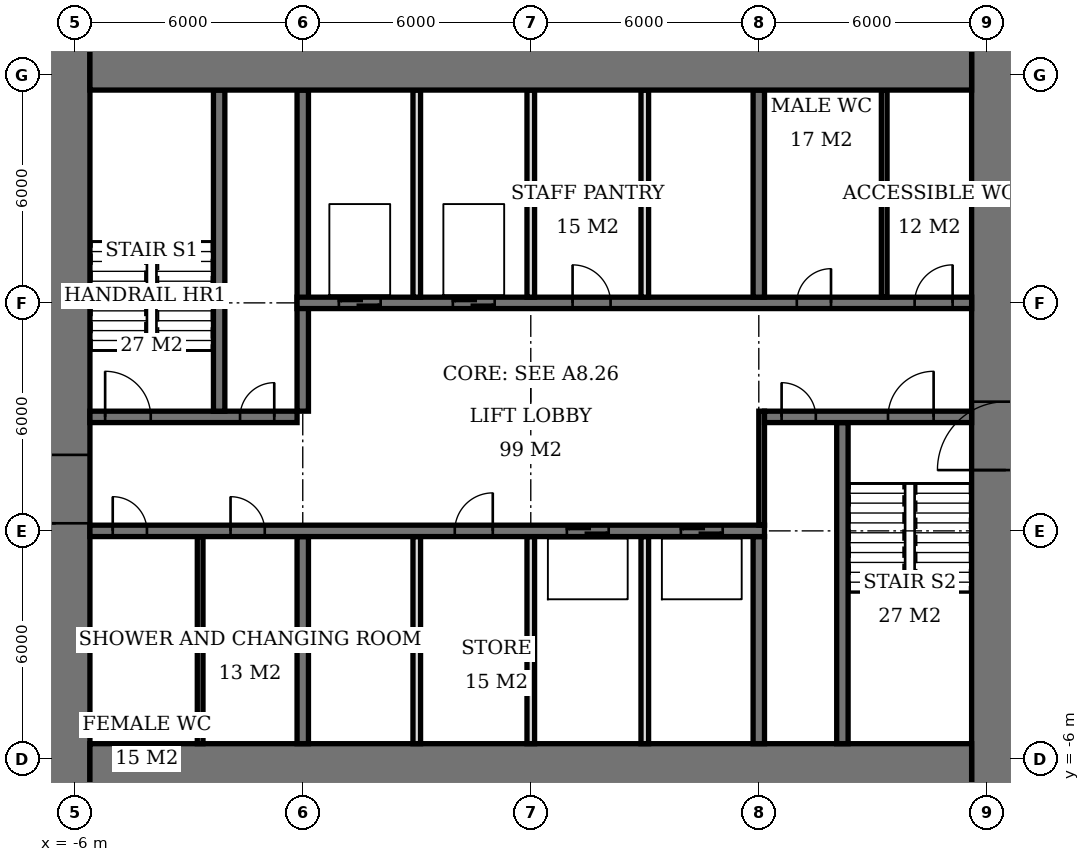
"""IFC4 building model, lengths in metres.
Left out: names, types, materials, properties, quantities, classifications, styles, units other than length and angle.
Written with IfcOpenShell. Run it as: python <this file> out.ifc"""

import sys

from ifc_helpers import new_model, si_unit, direction, frame, frame_2d, origin, place, context, subcontext, project, spatial, rectangle, extrude, element, fill, save


model = new_model("IFC4")
c1 = context("Model", 3, precision=1e-05, world=origin(), true_north=direction((0.0, 1.0)))
c2 = subcontext(c1, "Body", "Model", "MODEL_VIEW")
j1 = project(units=[si_unit("LENGTHUNIT", "METRE"), si_unit("PLANEANGLEUNIT", "RADIAN")], contexts=[c1])
p1 = place(None, origin())
s1 = spatial("IfcSite", under=j1, at=p1, CompositionType="ELEMENT")
p2 = place(p1, origin())
s2 = spatial("IfcBuilding", under=s1, at=p2, CompositionType="ELEMENT")
p3 = place(p2, frame((0.0, 0.0, 216.2)))
s3 = spatial("IfcBuildingStorey", under=s2, at=p3, CompositionType="ELEMENT", Elevation=216.2)
for number, where, z_axis, x_axis in (
    (1, (-5.6, -6.6, 0.0), (0.0, 0.0, 1.0), (1.0, 0.0, 0.0)),
    (2, (-5.6, 12.6, 0.0), (0.0, 0.0, 1.0), (1.0, 0.0, 0.0)),
):
    element("IfcWall", number, at=place(p3, frame(where, z_axis=z_axis, x_axis=x_axis)), inside=s3, PredefinedType="SHEAR", context=c2, shape_type="SweptSolid", body=[
        extrude(rectangle(XDim=23.2, YDim=2.0, at=frame_2d((11.6, 0.0))), origin(), (0.0, 0.0, 1.0), 3.9),
    ])
p4 = place(p3, frame((-6.5, -7.6, 0.0), z_axis=(0.0, 0.0, 1.0), x_axis=(0.0, 1.0, 0.0)))
e3 = element("IfcWall", 3, at=p4, inside=s3, PredefinedType="SHEAR", context=c2, shape_type="SweptSolid", body=[
    extrude(rectangle(XDim=21.2, YDim=1.8, at=frame_2d((10.6, 0.0))), origin(), (0.0, 0.0, 1.0), 3.9),
])
p5 = place(p4, frame((7.8, 0.0, 0.0)))
e4 = element("IfcOpeningElement", 4, at=p5, cuts=e3, PredefinedType="OPENING", context=c2, shape_type="SweptSolid", body=[
    extrude(rectangle(XDim=1.8, YDim=2.4, at=frame_2d((0.9, 1.2))), frame((0.0, 0.91, 0.0), z_axis=(0.0, -1.0, 0.0), x_axis=(1.0, 0.0, 0.0)), (0.0, 0.0, 1.0), 1.82),
])
p6 = place(p3, frame((18.5, -7.6, 0.0), z_axis=(0.0, 0.0, 1.0), x_axis=(0.0, 1.0, 0.0)))
e5 = element("IfcWall", 5, at=p6, inside=s3, PredefinedType="SHEAR", context=c2, shape_type="SweptSolid", body=[
    extrude(rectangle(XDim=21.2, YDim=1.8, at=frame_2d((10.6, 0.0))), origin(), (0.0, 0.0, 1.0), 3.9),
])
p7 = place(p6, frame((9.2, 0.0, 0.0)))
e6 = element("IfcOpeningElement", 6, at=p7, cuts=e5, PredefinedType="OPENING", context=c2, shape_type="SweptSolid", body=[
    extrude(rectangle(XDim=1.8, YDim=2.4, at=frame_2d((0.9, 1.2))), frame((0.0, 0.91, 0.0), z_axis=(0.0, -1.0, 0.0), x_axis=(1.0, 0.0, 0.0)), (0.0, 0.0, 1.0), 1.82),
])
p8 = place(p3, frame((-5.6, 0.0, 0.0), z_axis=(0.0, 0.0, 1.0), x_axis=(1.0, 0.0, 0.0)))
e7 = element("IfcWall", 7, at=p8, inside=s3, PredefinedType="SHEAR", context=c2, shape_type="SweptSolid", body=[
    extrude(rectangle(XDim=17.75, YDim=0.3, at=frame_2d((8.875, 0.0))), origin(), (0.0, 0.0, 1.0), 3.9),
])
p9 = place(p8, frame((0.6, 0.0, 0.0)))
e8 = element("IfcOpeningElement", 8, at=p9, cuts=e7, PredefinedType="OPENING", context=c2, shape_type="SweptSolid", body=[
    extrude(rectangle(XDim=0.9, YDim=2.1, at=frame_2d((0.45, 1.05))), frame((0.0, 0.16, 0.0), z_axis=(0.0, -1.0, 0.0), x_axis=(1.0, 0.0, 0.0)), (0.0, 0.0, 1.0), 0.32),
])
p10 = place(p8, frame((3.7, 0.0, 0.0)))
e9 = element("IfcOpeningElement", 9, at=p10, cuts=e7, PredefinedType="OPENING", context=c2, shape_type="SweptSolid", body=[
    extrude(rectangle(XDim=0.9, YDim=2.1, at=frame_2d((0.45, 1.05))), frame((0.0, 0.16, 0.0), z_axis=(0.0, -1.0, 0.0), x_axis=(1.0, 0.0, 0.0)), (0.0, 0.0, 1.0), 0.32),
])
p11 = place(p8, frame((9.6, 0.0, 0.0)))
e10 = element("IfcOpeningElement", 10, at=p11, cuts=e7, PredefinedType="OPENING", context=c2, shape_type="SweptSolid", body=[
    extrude(rectangle(XDim=1.0, YDim=2.1, at=frame_2d((0.5, 1.05))), frame((0.0, 0.16, 0.0), z_axis=(0.0, -1.0, 0.0), x_axis=(1.0, 0.0, 0.0)), (0.0, 0.0, 1.0), 0.32),
])
p12 = place(p8, frame((12.55, 0.0, 0.0)))
e11 = element("IfcOpeningElement", 11, at=p12, cuts=e7, PredefinedType="OPENING", context=c2, shape_type="SweptSolid", body=[
    extrude(rectangle(XDim=1.1, YDim=2.1, at=frame_2d((0.55, 1.05))), frame((0.0, 0.16, 0.0), z_axis=(0.0, -1.0, 0.0), x_axis=(1.0, 0.0, 0.0)), (0.0, 0.0, 1.0), 0.32),
])
p13 = place(p8, frame((15.55, 0.0, 0.0)))
e12 = element("IfcOpeningElement", 12, at=p13, cuts=e7, PredefinedType="OPENING", context=c2, shape_type="SweptSolid", body=[
    extrude(rectangle(XDim=1.1, YDim=2.1, at=frame_2d((0.55, 1.05))), frame((0.0, 0.16, 0.0), z_axis=(0.0, -1.0, 0.0), x_axis=(1.0, 0.0, 0.0)), (0.0, 0.0, 1.0), 0.32),
])
p14 = place(p3, frame((-5.6, 3.0, 0.0), z_axis=(0.0, 0.0, 1.0), x_axis=(1.0, 0.0, 0.0)))
e13 = element("IfcWall", 13, at=p14, inside=s3, PredefinedType="SHEAR", context=c2, shape_type="SweptSolid", body=[
    extrude(rectangle(XDim=5.45, YDim=0.3, at=frame_2d((2.725, 0.0))), origin(), (0.0, 0.0, 1.0), 3.9),
])
p15 = place(p14, frame((0.4, 0.0, 0.0)))
e14 = element("IfcOpeningElement", 14, at=p15, cuts=e13, PredefinedType="OPENING", context=c2, shape_type="SweptSolid", body=[
    extrude(rectangle(XDim=1.2, YDim=2.1, at=frame_2d((0.6, 1.05))), frame((0.0, 0.16, 0.0), z_axis=(0.0, -1.0, 0.0), x_axis=(1.0, 0.0, 0.0)), (0.0, 0.0, 1.0), 0.32),
])
p16 = place(p14, frame((3.95, 0.0, 0.0)))
e15 = element("IfcOpeningElement", 15, at=p16, cuts=e13, PredefinedType="OPENING", context=c2, shape_type="SweptSolid", body=[
    extrude(rectangle(XDim=0.9, YDim=2.1, at=frame_2d((0.45, 1.05))), frame((0.0, 0.16, 0.0), z_axis=(0.0, -1.0, 0.0), x_axis=(1.0, 0.0, 0.0)), (0.0, 0.0, 1.0), 0.32),
])
p17 = place(p3, frame((12.15, 3.0, 0.0), z_axis=(0.0, 0.0, 1.0), x_axis=(1.0, 0.0, 0.0)))
e16 = element("IfcWall", 16, at=p17, inside=s3, PredefinedType="SHEAR", context=c2, shape_type="SweptSolid", body=[
    extrude(rectangle(XDim=5.45, YDim=0.3, at=frame_2d((2.725, 0.0))), origin(), (0.0, 0.0, 1.0), 3.9),
])
p18 = place(p17, frame((3.25, 0.0, 0.0)))
e17 = element("IfcOpeningElement", 17, at=p18, cuts=e16, PredefinedType="OPENING", context=c2, shape_type="SweptSolid", body=[
    extrude(rectangle(XDim=1.2, YDim=2.1, at=frame_2d((0.6, 1.05))), frame((0.0, 0.16, 0.0), z_axis=(0.0, -1.0, 0.0), x_axis=(1.0, 0.0, 0.0)), (0.0, 0.0, 1.0), 0.32),
])
p19 = place(p17, frame((0.45, 0.0, 0.0)))
e18 = element("IfcOpeningElement", 18, at=p19, cuts=e16, PredefinedType="OPENING", context=c2, shape_type="SweptSolid", body=[
    extrude(rectangle(XDim=0.9, YDim=2.1, at=frame_2d((0.45, 1.05))), frame((0.0, 0.16, 0.0), z_axis=(0.0, -1.0, 0.0), x_axis=(1.0, 0.0, 0.0)), (0.0, 0.0, 1.0), 0.32),
])
p20 = place(p3, frame((-0.15, 6.0, 0.0), z_axis=(0.0, 0.0, 1.0), x_axis=(1.0, 0.0, 0.0)))
e19 = element("IfcWall", 19, at=p20, inside=s3, PredefinedType="SHEAR", context=c2, shape_type="SweptSolid", body=[
    extrude(rectangle(XDim=17.75, YDim=0.3, at=frame_2d((8.875, 0.0))), origin(), (0.0, 0.0, 1.0), 3.9),
])
p21 = place(p20, frame((13.15, 0.0, 0.0)))
e20 = element("IfcOpeningElement", 20, at=p21, cuts=e19, PredefinedType="OPENING", context=c2, shape_type="SweptSolid", body=[
    extrude(rectangle(XDim=0.9, YDim=2.1, at=frame_2d((0.45, 1.05))), frame((0.0, 0.16, 0.0), z_axis=(0.0, -1.0, 0.0), x_axis=(1.0, 0.0, 0.0)), (0.0, 0.0, 1.0), 0.32),
])
p22 = place(p20, frame((16.25, 0.0, 0.0)))
e21 = element("IfcOpeningElement", 21, at=p22, cuts=e19, PredefinedType="OPENING", context=c2, shape_type="SweptSolid", body=[
    extrude(rectangle(XDim=1.0, YDim=2.1, at=frame_2d((0.5, 1.05))), frame((0.0, 0.16, 0.0), z_axis=(0.0, -1.0, 0.0), x_axis=(1.0, 0.0, 0.0)), (0.0, 0.0, 1.0), 0.32),
])
p23 = place(p20, frame((7.25, 0.0, 0.0)))
e22 = element("IfcOpeningElement", 22, at=p23, cuts=e19, PredefinedType="OPENING", context=c2, shape_type="SweptSolid", body=[
    extrude(rectangle(XDim=1.0, YDim=2.1, at=frame_2d((0.5, 1.05))), frame((0.0, 0.16, 0.0), z_axis=(0.0, -1.0, 0.0), x_axis=(1.0, 0.0, 0.0)), (0.0, 0.0, 1.0), 0.32),
])
p24 = place(p20, frame((1.1, 0.0, 0.0)))
e23 = element("IfcOpeningElement", 23, at=p24, cuts=e19, PredefinedType="OPENING", context=c2, shape_type="SweptSolid", body=[
    extrude(rectangle(XDim=1.1, YDim=2.1, at=frame_2d((0.55, 1.05))), frame((0.0, 0.16, 0.0), z_axis=(0.0, -1.0, 0.0), x_axis=(1.0, 0.0, 0.0)), (0.0, 0.0, 1.0), 0.32),
])
p25 = place(p20, frame((4.1, 0.0, 0.0)))
e24 = element("IfcOpeningElement", 24, at=p25, cuts=e19, PredefinedType="OPENING", context=c2, shape_type="SweptSolid", body=[
    extrude(rectangle(XDim=1.1, YDim=2.1, at=frame_2d((0.55, 1.05))), frame((0.0, 0.16, 0.0), z_axis=(0.0, -1.0, 0.0), x_axis=(1.0, 0.0, 0.0)), (0.0, 0.0, 1.0), 0.32),
])
p26 = place(p3, frame((0.0, -5.6, 0.0), z_axis=(0.0, 0.0, 1.0), x_axis=(0.0, 1.0, 0.0)))
e25 = element("IfcWall", 25, at=p26, inside=s3, PredefinedType="SHEAR", context=c2, shape_type="SweptSolid", body=[
    extrude(rectangle(XDim=5.45, YDim=0.3, at=frame_2d((2.725, 0.0))), origin(), (0.0, 0.0, 1.0), 3.9),
])
p27 = place(p3, frame((0.0, 3.15, 0.0), z_axis=(0.0, 0.0, 1.0), x_axis=(0.0, 1.0, 0.0)))
e26 = element("IfcWall", 26, at=p27, inside=s3, PredefinedType="SHEAR", context=c2, shape_type="SweptSolid", body=[
    extrude(rectangle(XDim=8.45, YDim=0.3, at=frame_2d((4.225, 0.0))), origin(), (0.0, 0.0, 1.0), 3.9),
])
for number, where, z_axis, x_axis in (
    (27, (12.0, -5.6, 0.0), (0.0, 0.0, 1.0), (0.0, 1.0, 0.0)),
    (28, (12.0, 6.15, 0.0), (0.0, 0.0, 1.0), (0.0, 1.0, 0.0)),
):
    element("IfcWall", number, at=place(p3, frame(where, z_axis=z_axis, x_axis=x_axis)), inside=s3, PredefinedType="SHEAR", context=c2, shape_type="SweptSolid", body=[
        extrude(rectangle(XDim=5.45, YDim=0.3, at=frame_2d((2.725, 0.0))), origin(), (0.0, 0.0, 1.0), 3.9),
    ])
for number, where, z_axis, x_axis in (
    (29, (-2.2, 3.15, 0.0), (0.0, 0.0, 1.0), (0.0, 1.0, 0.0)),
    (30, (14.2, -5.6, 0.0), (0.0, 0.0, 1.0), (0.0, 1.0, 0.0)),
):
    element("IfcWall", number, at=place(p3, frame(where, z_axis=z_axis, x_axis=x_axis)), inside=s3, PredefinedType="SHEAR", context=c2, shape_type="SweptSolid", body=[
        extrude(rectangle(XDim=8.45, YDim=0.3, at=frame_2d((4.225, 0.0))), origin(), (0.0, 0.0, 1.0), 3.9),
    ])
for number, where, z_axis, x_axis in (
    (31, (3.0, 6.15, 0.0), (0.0, 0.0, 1.0), (0.0, 1.0, 0.0)),
    (32, (6.0, 6.15, 0.0), (0.0, 0.0, 1.0), (0.0, 1.0, 0.0)),
    (33, (9.0, 6.15, 0.0), (0.0, 0.0, 1.0), (0.0, 1.0, 0.0)),
    (34, (3.0, -5.6, 0.0), (0.0, 0.0, 1.0), (0.0, 1.0, 0.0)),
    (35, (6.0, -5.6, 0.0), (0.0, 0.0, 1.0), (0.0, 1.0, 0.0)),
    (36, (9.0, -5.6, 0.0), (0.0, 0.0, 1.0), (0.0, 1.0, 0.0)),
):
    element("IfcWall", number, at=place(p3, frame(where, z_axis=z_axis, x_axis=x_axis)), inside=s3, PredefinedType="SOLIDWALL", context=c2, shape_type="SweptSolid", body=[
        extrude(rectangle(XDim=5.45, YDim=0.2, at=frame_2d((2.725, 0.0))), origin(), (0.0, 0.0, 1.0), 3.9),
    ])
for number, where, z_axis, x_axis in (
    (37, (-2.7, -5.6, 0.0), (0.0, 0.0, 1.0), (0.0, 1.0, 0.0)),
    (38, (15.3, 6.15, 0.0), (0.0, 0.0, 1.0), (0.0, 1.0, 0.0)),
):
    element("IfcWall", number, at=place(p3, frame(where, z_axis=z_axis, x_axis=x_axis)), inside=s3, PredefinedType="PLUMBINGWALL", context=c2, shape_type="SweptSolid", body=[
        extrude(rectangle(XDim=5.45, YDim=0.15, at=frame_2d((2.725, 0.0))), origin(), (0.0, 0.0, 1.0), 3.65),
    ])
p28 = place(p3, frame((12.075, 0.15, 0.0), z_axis=(0.0, 0.0, 1.0), x_axis=(0.0, 1.0, 0.0)))
e39 = element("IfcWall", 39, at=p28, inside=s3, PredefinedType="PARTITIONING", context=c2, shape_type="SweptSolid", body=[
    extrude(rectangle(XDim=3.0, YDim=0.15, at=frame_2d((1.5, 0.0))), origin(), (0.0, 0.0, 1.0), 3.65),
])
p29 = place(p5, origin())
e40 = element("IfcDoor", 40, at=p29, inside=s3, OperationType="DOUBLE_DOOR_SINGLE_SWING", PredefinedType="DOOR", context=c2, shape_type="SweptSolid", body=[
    extrude(rectangle(XDim=1.8, YDim=2.4, at=frame_2d((0.9, 1.2))), frame((0.0, 0.025, 0.0), z_axis=(0.0, -1.0, 0.0), x_axis=(1.0, 0.0, 0.0)), (0.0, 0.0, 1.0), 0.05),
])
fill(e4, e40)
p30 = place(p7, origin())
e41 = element("IfcDoor", 41, at=p30, inside=s3, OperationType="DOUBLE_DOOR_SINGLE_SWING", PredefinedType="DOOR", context=c2, shape_type="SweptSolid", body=[
    extrude(rectangle(XDim=1.8, YDim=2.4, at=frame_2d((0.9, 1.2))), frame((0.0, 0.025, 0.0), z_axis=(0.0, -1.0, 0.0), x_axis=(1.0, 0.0, 0.0)), (0.0, 0.0, 1.0), 0.05),
])
fill(e6, e41)
p31 = place(p15, origin())
e42 = element("IfcDoor", 42, at=p31, inside=s3, OperationType="SINGLE_SWING_LEFT", PredefinedType="DOOR", context=c2, shape_type="SweptSolid", body=[
    extrude(rectangle(XDim=1.2, YDim=2.1, at=frame_2d((0.6, 1.05))), frame((0.0, 0.025, 0.0), z_axis=(0.0, -1.0, 0.0), x_axis=(1.0, 0.0, 0.0)), (0.0, 0.0, 1.0), 0.05),
])
fill(e14, e42)
p32 = place(p16, origin())
e43 = element("IfcDoor", 43, at=p32, inside=s3, OperationType="SINGLE_SWING_RIGHT", PredefinedType="DOOR", context=c2, shape_type="SweptSolid", body=[
    extrude(rectangle(XDim=0.9, YDim=2.1, at=frame_2d((0.45, 1.05))), frame((0.0, 0.025, 0.0), z_axis=(0.0, -1.0, 0.0), x_axis=(1.0, 0.0, 0.0)), (0.0, 0.0, 1.0), 0.05),
])
fill(e15, e43)
p33 = place(p18, origin())
e44 = element("IfcDoor", 44, at=p33, inside=s3, OperationType="SINGLE_SWING_RIGHT", PredefinedType="DOOR", context=c2, shape_type="SweptSolid", body=[
    extrude(rectangle(XDim=1.2, YDim=2.1, at=frame_2d((0.6, 1.05))), frame((0.0, 0.025, 0.0), z_axis=(0.0, -1.0, 0.0), x_axis=(1.0, 0.0, 0.0)), (0.0, 0.0, 1.0), 0.05),
])
fill(e17, e44)
p34 = place(p19, origin())
e45 = element("IfcDoor", 45, at=p34, inside=s3, OperationType="SINGLE_SWING_LEFT", PredefinedType="DOOR", context=c2, shape_type="SweptSolid", body=[
    extrude(rectangle(XDim=0.9, YDim=2.1, at=frame_2d((0.45, 1.05))), frame((0.0, 0.025, 0.0), z_axis=(0.0, -1.0, 0.0), x_axis=(1.0, 0.0, 0.0)), (0.0, 0.0, 1.0), 0.05),
])
fill(e18, e45)
p35 = place(p9, origin())
e46 = element("IfcDoor", 46, at=p35, inside=s3, OperationType="SINGLE_SWING_LEFT", PredefinedType="DOOR", context=c2, shape_type="SweptSolid", body=[
    extrude(rectangle(XDim=0.9, YDim=2.1, at=frame_2d((0.45, 1.05))), frame((0.0, 0.025, 0.0), z_axis=(0.0, -1.0, 0.0), x_axis=(1.0, 0.0, 0.0)), (0.0, 0.0, 1.0), 0.05),
])
fill(e8, e46)
p36 = place(p10, origin())
e47 = element("IfcDoor", 47, at=p36, inside=s3, OperationType="SINGLE_SWING_LEFT", PredefinedType="DOOR", context=c2, shape_type="SweptSolid", body=[
    extrude(rectangle(XDim=0.9, YDim=2.1, at=frame_2d((0.45, 1.05))), frame((0.0, 0.025, 0.0), z_axis=(0.0, -1.0, 0.0), x_axis=(1.0, 0.0, 0.0)), (0.0, 0.0, 1.0), 0.05),
])
fill(e9, e47)
p37 = place(p21, origin())
e48 = element("IfcDoor", 48, at=p37, inside=s3, OperationType="SINGLE_SWING_RIGHT", PredefinedType="DOOR", context=c2, shape_type="SweptSolid", body=[
    extrude(rectangle(XDim=0.9, YDim=2.1, at=frame_2d((0.45, 1.05))), frame((0.0, 0.025, 0.0), z_axis=(0.0, -1.0, 0.0), x_axis=(1.0, 0.0, 0.0)), (0.0, 0.0, 1.0), 0.05),
])
fill(e20, e48)
p38 = place(p22, origin())
e49 = element("IfcDoor", 49, at=p38, inside=s3, OperationType="SINGLE_SWING_RIGHT", PredefinedType="DOOR", context=c2, shape_type="SweptSolid", body=[
    extrude(rectangle(XDim=1.0, YDim=2.1, at=frame_2d((0.5, 1.05))), frame((0.0, 0.025, 0.0), z_axis=(0.0, -1.0, 0.0), x_axis=(1.0, 0.0, 0.0)), (0.0, 0.0, 1.0), 0.05),
])
fill(e21, e49)
p39 = place(p23, origin())
e50 = element("IfcDoor", 50, at=p39, inside=s3, OperationType="SINGLE_SWING_LEFT", PredefinedType="DOOR", context=c2, shape_type="SweptSolid", body=[
    extrude(rectangle(XDim=1.0, YDim=2.1, at=frame_2d((0.5, 1.05))), frame((0.0, 0.025, 0.0), z_axis=(0.0, -1.0, 0.0), x_axis=(1.0, 0.0, 0.0)), (0.0, 0.0, 1.0), 0.05),
])
fill(e22, e50)
p40 = place(p11, origin())
e51 = element("IfcDoor", 51, at=p40, inside=s3, OperationType="SINGLE_SWING_RIGHT", PredefinedType="DOOR", context=c2, shape_type="SweptSolid", body=[
    extrude(rectangle(XDim=1.0, YDim=2.1, at=frame_2d((0.5, 1.05))), frame((0.0, 0.025, 0.0), z_axis=(0.0, -1.0, 0.0), x_axis=(1.0, 0.0, 0.0)), (0.0, 0.0, 1.0), 0.05),
])
fill(e10, e51)
p41 = place(p24, origin())
e52 = element("IfcDoor", 52, at=p41, inside=s3, OperationType="DOUBLE_DOOR_SLIDING", PredefinedType="USERDEFINED", context=c2, shape_type="SweptSolid", body=[
    extrude(rectangle(XDim=1.1, YDim=2.1, at=frame_2d((0.55, 1.05))), frame((0.0, 0.025, 0.0), z_axis=(0.0, -1.0, 0.0), x_axis=(1.0, 0.0, 0.0)), (0.0, 0.0, 1.0), 0.05),
])
fill(e23, e52)
p42 = place(p25, origin())
e53 = element("IfcDoor", 53, at=p42, inside=s3, OperationType="DOUBLE_DOOR_SLIDING", PredefinedType="USERDEFINED", context=c2, shape_type="SweptSolid", body=[
    extrude(rectangle(XDim=1.1, YDim=2.1, at=frame_2d((0.55, 1.05))), frame((0.0, 0.025, 0.0), z_axis=(0.0, -1.0, 0.0), x_axis=(1.0, 0.0, 0.0)), (0.0, 0.0, 1.0), 0.05),
])
fill(e24, e53)
p43 = place(p12, origin())
e54 = element("IfcDoor", 54, at=p43, inside=s3, OperationType="DOUBLE_DOOR_SLIDING", PredefinedType="USERDEFINED", context=c2, shape_type="SweptSolid", body=[
    extrude(rectangle(XDim=1.1, YDim=2.1, at=frame_2d((0.55, 1.05))), frame((0.0, 0.025, 0.0), z_axis=(0.0, -1.0, 0.0), x_axis=(1.0, 0.0, 0.0)), (0.0, 0.0, 1.0), 0.05),
])
fill(e11, e54)
p44 = place(p13, origin())
e55 = element("IfcDoor", 55, at=p44, inside=s3, OperationType="DOUBLE_DOOR_SLIDING", PredefinedType="USERDEFINED", context=c2, shape_type="SweptSolid", body=[
    extrude(rectangle(XDim=1.1, YDim=2.1, at=frame_2d((0.55, 1.05))), frame((0.0, 0.025, 0.0), z_axis=(0.0, -1.0, 0.0), x_axis=(1.0, 0.0, 0.0)), (0.0, 0.0, 1.0), 0.05),
])
fill(e12, e55)
save(model, sys.argv[1])
